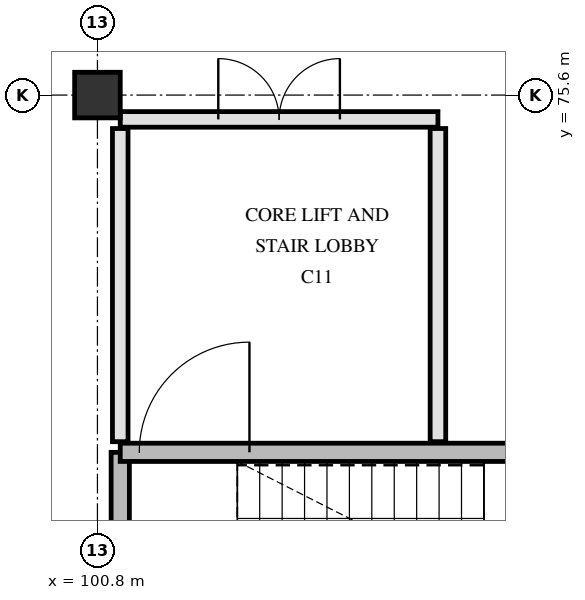
"""IFC4 building model, lengths in metres.
Left out: names, types, materials, properties, quantities, classifications, styles, units other than length and angle.
Written with IfcOpenShell. Run it as: python <this file> out.ifc"""

import sys

from ifc_helpers import new_model, si_unit, direction, frame, frame_2d, origin, origin_2d, place, context, subcontext, project, spatial, rectangle, extrude, element, fill, save


model = new_model("IFC4")
c1 = context("Model", 3, precision=1e-05, world=origin(), true_north=direction((0.0, 1.0)))
c2 = subcontext(c1, "Body", "Model", "MODEL_VIEW")
j1 = project(units=[si_unit("LENGTHUNIT", "METRE"), si_unit("PLANEANGLEUNIT", "RADIAN")], contexts=[c1])
p1 = place(None, origin())
s1 = spatial("IfcSite", under=j1, at=p1, CompositionType="ELEMENT")
p2 = place(p1, origin())
s2 = spatial("IfcBuilding", under=s1, at=p2, CompositionType="ELEMENT")
p3 = place(p2, frame((0.0, 0.0, 22.5)))
s3 = spatial("IfcBuildingStorey", under=s2, at=p3, CompositionType="ELEMENT", Elevation=22.5)
p4 = place(p3, frame((100.8, 75.6, 0.0), z_axis=(0.0, 0.0, 1.0), x_axis=(1.0, 0.0, 0.0)))
e1 = element("IfcColumn", 1, at=p4, inside=s3, PredefinedType="COLUMN", context=c2, shape_type="SweptSolid", body=[
    extrude(rectangle(XDim=0.6, YDim=0.6, at=origin_2d()), origin(), (0.0, 0.0, 1.0), 3.9),
])
p5 = place(p3, frame((101.1, 67.58, 0.0), z_axis=(0.0, 0.0, 1.0), x_axis=(0.0, 1.0, 0.0)))
e2 = element("IfcWall", 2, at=p5, inside=s3, PredefinedType="SHEAR", context=c2, shape_type="SweptSolid", body=[
    extrude(rectangle(XDim=3.32, YDim=0.24, at=frame_2d((1.66, 0.0))), origin(), (0.0, 0.0, 1.0), 3.62),
])
p6 = place(p3, frame((101.1, 70.9, 0.0), z_axis=(0.0, 0.0, 1.0), x_axis=(1.0, 0.0, 0.0)))
e3 = element("IfcWall", 3, at=p6, inside=s3, PredefinedType="SHEAR", context=c2, shape_type="SweptSolid", body=[
    extrude(rectangle(XDim=7.82, YDim=0.24, at=frame_2d((3.91, 0.0))), origin(), (0.0, 0.0, 1.0), 3.62),
])
p7 = place(p6, frame((0.25, 0.0, 0.0)))
e4 = element("IfcOpeningElement", 4, at=p7, cuts=e3, PredefinedType="OPENING", context=c2, shape_type="SweptSolid", body=[
    extrude(rectangle(XDim=1.45, YDim=2.2, at=frame_2d((0.725, 1.1))), frame((0.0, 0.13, 0.0), z_axis=(0.0, -1.0, 0.0), x_axis=(1.0, 0.0, 0.0)), (0.0, 0.0, 1.0), 0.26),
])
for number, where, z_axis, x_axis in (
    (5, (105.28, 71.04, 0.0), (0.0, 0.0, 1.0), (0.0, 1.0, 0.0)),
    (6, (101.1, 71.04, 0.0), (0.0, 0.0, 1.0), (0.0, 1.0, 0.0)),
):
    element("IfcWall", number, at=place(p3, frame(where, z_axis=z_axis, x_axis=x_axis)), inside=s3, PredefinedType="PARTITIONING", context=c2, shape_type="SweptSolid", body=[
        extrude(rectangle(XDim=4.12, YDim=0.205, at=frame_2d((2.06, 0.0))), origin(), (0.0, 0.0, 1.0), 3.61),
    ])
p8 = place(p3, frame((101.1, 75.28, 0.0), z_axis=(0.0, 0.0, 1.0), x_axis=(1.0, 0.0, 0.0)))
e7 = element("IfcWall", 7, at=p8, inside=s3, PredefinedType="PARTITIONING", context=c2, shape_type="SweptSolid", body=[
    extrude(rectangle(XDim=4.18, YDim=0.205, at=frame_2d((2.09, 0.0))), origin(), (0.0, 0.0, 1.0), 3.61),
])
p9 = place(p8, frame((1.29, 0.0, 0.0)))
e8 = element("IfcOpeningElement", 8, at=p9, cuts=e7, PredefinedType="OPENING", context=c2, shape_type="SweptSolid", body=[
    extrude(rectangle(XDim=1.6, YDim=2.25, at=frame_2d((0.8, 1.125))), frame((0.0, 0.113, 0.0), z_axis=(0.0, -1.0, 0.0), x_axis=(1.0, 0.0, 0.0)), (0.0, 0.0, 1.0), 0.225),
])
p10 = place(p7, origin())
e9 = element("IfcDoor", 9, at=p10, inside=s3, OperationType="SINGLE_SWING_RIGHT", PredefinedType="DOOR", context=c2, shape_type="SweptSolid", body=[
    extrude(rectangle(XDim=1.45, YDim=2.2, at=frame_2d((0.725, 1.1))), frame((0.0, 0.025, 0.0), z_axis=(0.0, -1.0, 0.0), x_axis=(1.0, 0.0, 0.0)), (0.0, 0.0, 1.0), 0.05),
])
fill(e4, e9)
p11 = place(p9, origin())
e10 = element("IfcDoor", 10, at=p11, inside=s3, OperationType="DOUBLE_SWING_LEFT", PredefinedType="DOOR", context=c2, shape_type="SweptSolid", body=[
    extrude(rectangle(XDim=1.6, YDim=2.25, at=frame_2d((0.8, 1.125))), frame((0.0, 0.025, 0.0), z_axis=(0.0, -1.0, 0.0), x_axis=(1.0, 0.0, 0.0)), (0.0, 0.0, 1.0), 0.05),
])
fill(e8, e10)
save(model, sys.argv[1])
